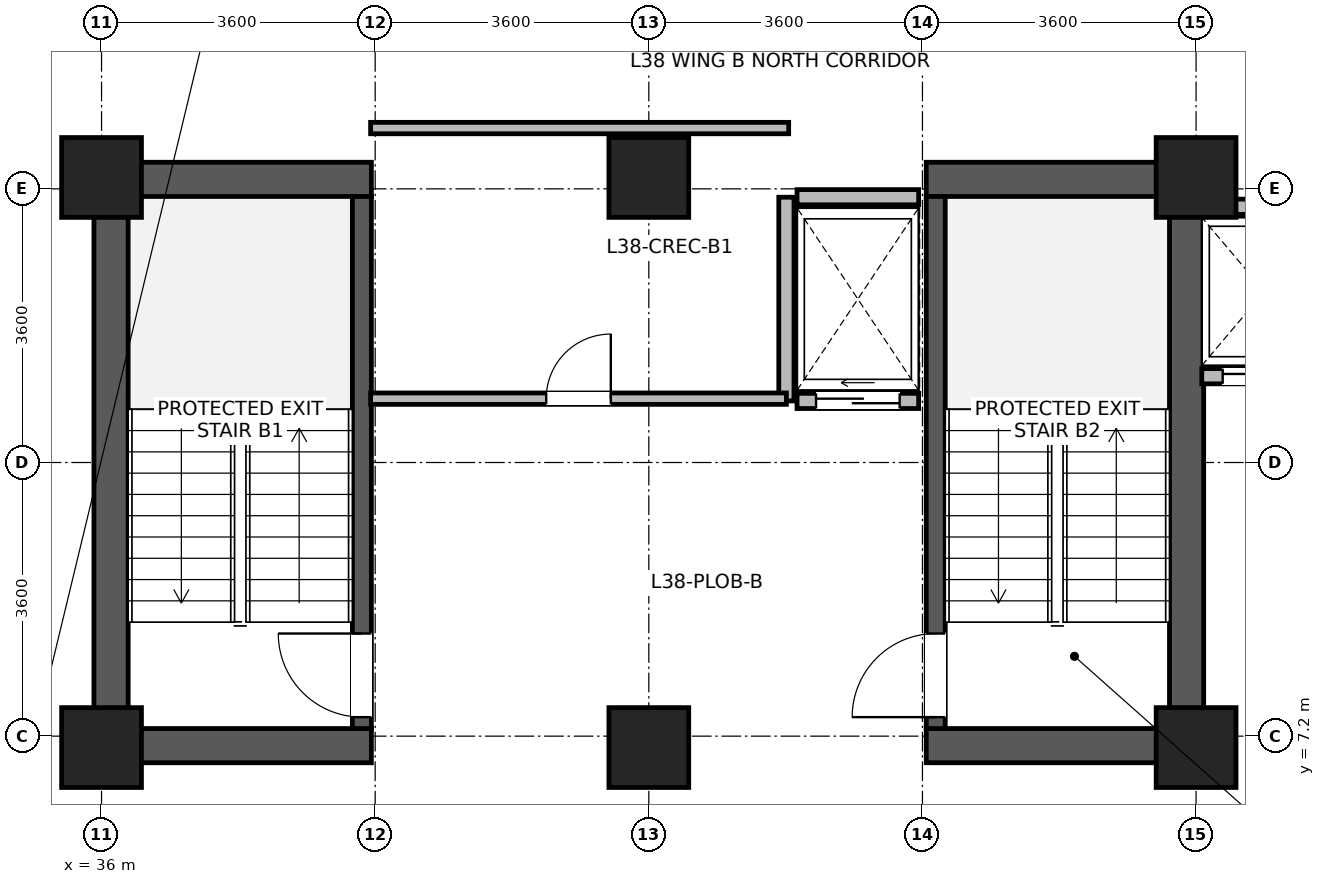
"""IFC4 building model, lengths in metres.
Left out: names, types, materials, properties, quantities, classifications, styles, units other than length and angle.
Written with IfcOpenShell. Run it as: python <this file> out.ifc"""

import sys

from ifc_helpers import new_model, si_unit, direction, frame, frame_2d, origin, origin_2d, place, context, subcontext, project, spatial, rectangle, extrude, source, transform, mapped, element, fill, save


model = new_model("IFC4")
c1 = context("Model", 3, precision=1e-05, world=origin(), true_north=direction((0.0, 1.0)))
c2 = subcontext(c1, "Body", "Model", "MODEL_VIEW")
j1 = project(units=[si_unit("LENGTHUNIT", "METRE"), si_unit("PLANEANGLEUNIT", "RADIAN")], contexts=[c1])
p1 = place(None, origin())
s1 = spatial("IfcSite", under=j1, at=p1, CompositionType="ELEMENT")
p2 = place(p1, origin())
s2 = spatial("IfcBuilding", under=s1, at=p2, CompositionType="ELEMENT")
p3 = place(p2, frame((0.0, 0.0, 151.3)))
s3 = spatial("IfcBuildingStorey", under=s2, at=p3, CompositionType="ELEMENT", Elevation=151.3)
for number, where, z_axis, x_axis in (
    (1, (36.125, 6.85, 0.0), (0.0, 0.0, 1.0), (0.0, 1.0, 0.0)),
    (2, (50.275, 6.85, 0.0), (0.0, 0.0, 1.0), (0.0, 1.0, 0.0)),
):
    element("IfcWall", number, at=place(p3, frame(where, z_axis=z_axis, x_axis=x_axis)), inside=s3, PredefinedType="SHEAR", context=c2, shape_type="SweptSolid", body=[
        extrude(rectangle(XDim=7.9, YDim=0.45, at=frame_2d((3.95, 0.0))), origin(), (0.0, 0.0, 1.0), 3.46),
    ])
for number, where, z_axis, x_axis in (
    (3, (36.35, 7.075, 0.0), (0.0, 0.0, 1.0), (1.0, 0.0, 0.0)),
    (4, (46.85, 7.075, 0.0), (0.0, 0.0, 1.0), (1.0, 0.0, 0.0)),
    (5, (36.35, 14.525, 0.0), (0.0, 0.0, 1.0), (1.0, 0.0, 0.0)),
    (6, (46.85, 14.525, 0.0), (0.0, 0.0, 1.0), (1.0, 0.0, 0.0)),
):
    element("IfcWall", number, at=place(p3, frame(where, z_axis=z_axis, x_axis=x_axis)), inside=s3, PredefinedType="SHEAR", context=c2, shape_type="SweptSolid", body=[
        extrude(rectangle(XDim=3.2, YDim=0.45, at=frame_2d((1.6, 0.0))), origin(), (0.0, 0.0, 1.0), 3.46),
    ])
p4 = place(p3, frame((39.425, 7.3, 0.0), z_axis=(0.0, 0.0, 1.0), x_axis=(0.0, 1.0, 0.0)))
e7 = element("IfcWall", 7, at=p4, inside=s3, PredefinedType="SHEAR", context=c2, shape_type="SweptSolid", body=[
    extrude(rectangle(XDim=7.0, YDim=0.25, at=frame_2d((3.5, 0.0))), origin(), (0.0, 0.0, 1.0), 3.46),
])
p5 = place(p4, frame((0.15, 0.0, 0.0)))
e8 = element("IfcOpeningElement", 8, at=p5, cuts=e7, PredefinedType="OPENING", context=c2, shape_type="SweptSolid", body=[
    extrude(rectangle(XDim=1.1, YDim=2.08, at=frame_2d((0.55, 1.04))), frame((0.0, 0.135, 0.0), z_axis=(0.0, -1.0, 0.0), x_axis=(1.0, 0.0, 0.0)), (0.0, 0.0, 1.0), 0.27),
])
p6 = place(p3, frame((46.975, 7.3, 0.0), z_axis=(0.0, 0.0, 1.0), x_axis=(0.0, 1.0, 0.0)))
e9 = element("IfcWall", 9, at=p6, inside=s3, PredefinedType="SHEAR", context=c2, shape_type="SweptSolid", body=[
    extrude(rectangle(XDim=7.0, YDim=0.25, at=frame_2d((3.5, 0.0))), origin(), (0.0, 0.0, 1.0), 3.46),
])
p7 = place(p6, frame((0.15, 0.0, 0.0)))
e10 = element("IfcOpeningElement", 10, at=p7, cuts=e9, PredefinedType="OPENING", context=c2, shape_type="SweptSolid", body=[
    extrude(rectangle(XDim=1.1, YDim=2.08, at=frame_2d((0.55, 1.04))), frame((0.0, 0.135, 0.0), z_axis=(0.0, -1.0, 0.0), x_axis=(1.0, 0.0, 0.0)), (0.0, 0.0, 1.0), 0.27),
])
m1 = source(origin(), c2, "Body", "SweptSolid", [
    extrude(rectangle(XDim=1.05, YDim=1.05, at=origin_2d()), origin(), (0.0, 0.0, 1.0), 3.7),
])
for number, where, z_axis, x_axis in (
    (11, (36.0, 7.05, 0.0), (0.0, 0.0, 1.0), (1.0, 0.0, 0.0)),
    (12, (36.0, 14.55, 0.0), (0.0, 0.0, 1.0), (1.0, 0.0, 0.0)),
    (13, (43.2, 7.05, 0.0), (0.0, 0.0, 1.0), (1.0, 0.0, 0.0)),
    (14, (43.2, 14.55, 0.0), (0.0, 0.0, 1.0), (1.0, 0.0, 0.0)),
    (15, (50.4, 7.05, 0.0), (0.0, 0.0, 1.0), (1.0, 0.0, 0.0)),
    (16, (50.4, 14.55, 0.0), (0.0, 0.0, 1.0), (1.0, 0.0, 0.0)),
):
    element("IfcColumn", number, at=place(p3, frame(where, z_axis=z_axis, x_axis=x_axis)), inside=s3, PredefinedType="COLUMN", context=c2, shape_type="MappedRepresentation", body=[
        mapped(m1, transform((0.0, 0.0, 0.0), x_axis=(1.0, 0.0, 0.0), y_axis=(0.0, 1.0, 0.0), z_axis=(0.0, 0.0, 1.0), scale=1.0)),
    ])
p8 = place(p3, frame((50.475, 11.935, 0.0), z_axis=(0.0, 0.0, 1.0), x_axis=(1.0, 0.0, 0.0)))
e17 = element("IfcWall", 17, at=p8, inside=s3, PredefinedType="PARTITIONING", context=c2, shape_type="SweptSolid", body=[
    extrude(rectangle(XDim=1.65, YDim=0.2, at=frame_2d((0.825, 0.0))), origin(), (0.0, 0.0, 1.0), 3.44),
])
p9 = place(p8, frame((0.275, 0.0, 0.0)))
e18 = element("IfcOpeningElement", 18, at=p9, cuts=e17, PredefinedType="OPENING", context=c2, shape_type="SweptSolid", body=[
    extrude(rectangle(XDim=1.1, YDim=2.12, at=frame_2d((0.55, 1.06))), frame((0.0, 0.11, 0.0), z_axis=(0.0, -1.0, 0.0), x_axis=(1.0, 0.0, 0.0)), (0.0, 0.0, 1.0), 0.22),
])
p10 = place(p3, frame((50.475, 14.165, 0.0), z_axis=(0.0, 0.0, 1.0), x_axis=(1.0, 0.0, 0.0)))
e19 = element("IfcWall", 19, at=p10, inside=s3, PredefinedType="PARTITIONING", context=c2, shape_type="SweptSolid", body=[
    extrude(rectangle(XDim=1.65, YDim=0.2, at=frame_2d((0.825, 0.0))), origin(), (0.0, 0.0, 1.0), 3.44),
])
p11 = place(p3, frame((45.15, 11.61, 0.0), z_axis=(0.0, 0.0, 1.0), x_axis=(1.0, 0.0, 0.0)))
e20 = element("IfcWall", 20, at=p11, inside=s3, PredefinedType="PARTITIONING", context=c2, shape_type="SweptSolid", body=[
    extrude(rectangle(XDim=1.6, YDim=0.2, at=frame_2d((0.8, 0.0))), origin(), (0.0, 0.0, 1.0), 3.44),
])
p12 = place(p11, frame((0.25, 0.0, 0.0)))
e21 = element("IfcOpeningElement", 21, at=p12, cuts=e20, PredefinedType="OPENING", context=c2, shape_type="SweptSolid", body=[
    extrude(rectangle(XDim=1.1, YDim=2.12, at=frame_2d((0.55, 1.06))), frame((0.0, 0.11, 0.0), z_axis=(0.0, -1.0, 0.0), x_axis=(1.0, 0.0, 0.0)), (0.0, 0.0, 1.0), 0.22),
])
p13 = place(p3, frame((45.15, 14.29, 0.0), z_axis=(0.0, 0.0, 1.0), x_axis=(1.0, 0.0, 0.0)))
e22 = element("IfcWall", 22, at=p13, inside=s3, PredefinedType="PARTITIONING", context=c2, shape_type="SweptSolid", body=[
    extrude(rectangle(XDim=1.6, YDim=0.2, at=frame_2d((0.8, 0.0))), origin(), (0.0, 0.0, 1.0), 2.44),
])
p14 = place(p3, frame((45.01, 11.61, 0.0), z_axis=(0.0, 0.0, 1.0), x_axis=(0.0, 1.0, 0.0)))
e23 = element("IfcWall", 23, at=p14, inside=s3, PredefinedType="PARTITIONING", context=c2, shape_type="SweptSolid", body=[
    extrude(rectangle(XDim=2.68, YDim=0.2, at=frame_2d((1.34, 0.0))), origin(), (0.0, 0.0, 1.0), 3.44),
])
p15 = place(p3, frame((39.54, 11.64, 0.0), z_axis=(0.0, 0.0, 1.0), x_axis=(1.0, 0.0, 0.0)))
e24 = element("IfcWall", 24, at=p15, inside=s3, PredefinedType="PARTITIONING", context=c2, shape_type="SweptSolid", body=[
    extrude(rectangle(XDim=5.47, YDim=0.15, at=frame_2d((2.735, 0.0))), origin(), (0.0, 0.0, 1.0), 3.44),
])
p16 = place(p15, frame((2.31, 0.0, 0.0)))
e25 = element("IfcOpeningElement", 25, at=p16, cuts=e24, PredefinedType="OPENING", context=c2, shape_type="SweptSolid", body=[
    extrude(rectangle(XDim=0.85, YDim=2.04, at=frame_2d((0.425, 1.02))), frame((0.0, 0.085, 0.0), z_axis=(0.0, -1.0, 0.0), x_axis=(1.0, 0.0, 0.0)), (0.0, 0.0, 1.0), 0.17),
])
p17 = place(p3, frame((39.54, 15.2, 0.0), z_axis=(0.0, 0.0, 1.0), x_axis=(1.0, 0.0, 0.0)))
e26 = element("IfcWall", 26, at=p17, inside=s3, PredefinedType="PARTITIONING", context=c2, shape_type="SweptSolid", body=[
    extrude(rectangle(XDim=5.5, YDim=0.15, at=frame_2d((2.75, 0.0))), origin(), (0.0, 0.0, 1.0), 3.44),
])
p18 = place(p5, origin())
e27 = element("IfcDoor", 27, at=p18, inside=s3, OperationType="SINGLE_SWING_RIGHT", PredefinedType="DOOR", context=c2, shape_type="SweptSolid", body=[
    extrude(rectangle(XDim=1.1, YDim=2.08, at=frame_2d((0.55, 1.04))), frame((0.0, 0.025, 0.0), z_axis=(0.0, -1.0, 0.0), x_axis=(1.0, 0.0, 0.0)), (0.0, 0.0, 1.0), 0.05),
])
fill(e8, e27)
p19 = place(p7, origin())
e28 = element("IfcDoor", 28, at=p19, inside=s3, OperationType="SINGLE_SWING_LEFT", PredefinedType="DOOR", context=c2, shape_type="SweptSolid", body=[
    extrude(rectangle(XDim=1.1, YDim=2.08, at=frame_2d((0.55, 1.04))), frame((0.0, 0.025, 0.0), z_axis=(0.0, -1.0, 0.0), x_axis=(1.0, 0.0, 0.0)), (0.0, 0.0, 1.0), 0.05),
])
fill(e10, e28)
p20 = place(p9, origin())
e29 = element("IfcDoor", 29, at=p20, inside=s3, OperationType="SLIDING_TO_LEFT", PredefinedType="DOOR", context=c2, shape_type="SweptSolid", body=[
    extrude(rectangle(XDim=1.1, YDim=2.12, at=frame_2d((0.55, 1.06))), frame((0.0, 0.025, 0.0), z_axis=(0.0, -1.0, 0.0), x_axis=(1.0, 0.0, 0.0)), (0.0, 0.0, 1.0), 0.05),
])
fill(e18, e29)
p21 = place(p12, origin())
e30 = element("IfcDoor", 30, at=p21, inside=s3, OperationType="SLIDING_TO_LEFT", PredefinedType="DOOR", context=c2, shape_type="SweptSolid", body=[
    extrude(rectangle(XDim=1.1, YDim=2.12, at=frame_2d((0.55, 1.06))), frame((0.0, 0.025, 0.0), z_axis=(0.0, -1.0, 0.0), x_axis=(1.0, 0.0, 0.0)), (0.0, 0.0, 1.0), 0.05),
])
fill(e21, e30)
p22 = place(p16, origin())
e31 = element("IfcDoor", 31, at=p22, inside=s3, OperationType="SINGLE_SWING_RIGHT", PredefinedType="DOOR", context=c2, shape_type="SweptSolid", body=[
    extrude(rectangle(XDim=0.85, YDim=2.04, at=frame_2d((0.425, 1.02))), frame((0.0, 0.025, 0.0), z_axis=(0.0, -1.0, 0.0), x_axis=(1.0, 0.0, 0.0)), (0.0, 0.0, 1.0), 0.05),
])
fill(e25, e31)
save(model, sys.argv[1])
